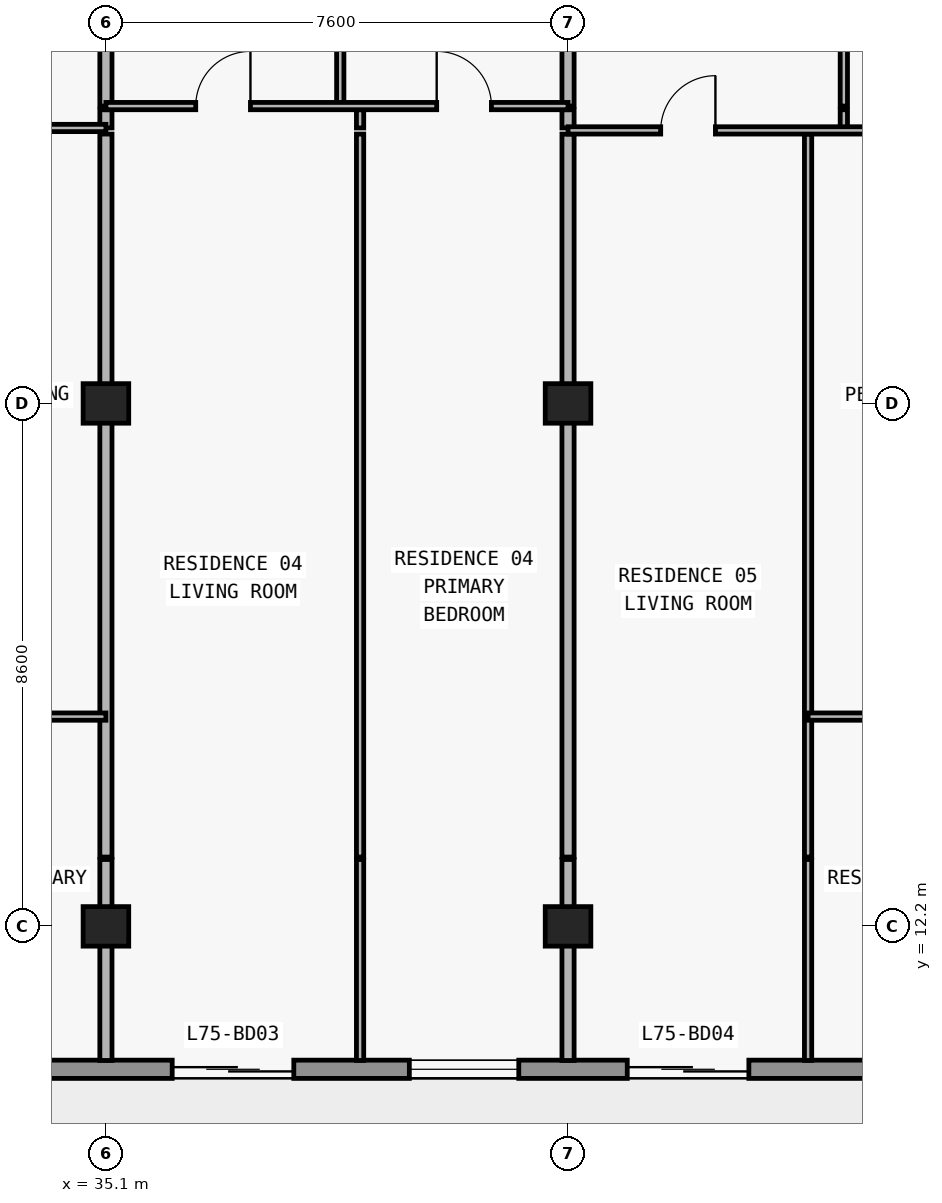
"""IFC4 building model, lengths in metres.
Left out: names, types, materials, properties, quantities, classifications, styles, units other than length and angle.
Written with IfcOpenShell. Run it as: python <this file> out.ifc"""

import sys

from ifc_helpers import new_model, si_unit, direction, frame, frame_2d, origin, origin_2d, place, context, subcontext, project, spatial, rectangle, extrude, element, fill, save


model = new_model("IFC4")
c1 = context("Model", 3, precision=1e-05, world=origin(), true_north=direction((0.0, 1.0)))
c2 = subcontext(c1, "Body", "Model", "MODEL_VIEW")
j1 = project(units=[si_unit("LENGTHUNIT", "METRE"), si_unit("PLANEANGLEUNIT", "RADIAN")], contexts=[c1])
p1 = place(None, origin())
s1 = spatial("IfcSite", under=j1, at=p1, CompositionType="ELEMENT")
p2 = place(p1, origin())
s2 = spatial("IfcBuilding", under=s1, at=p2, CompositionType="ELEMENT")
p3 = place(p2, frame((0.0, 0.0, 266.1)))
s3 = spatial("IfcBuildingStorey", under=s2, at=p3, CompositionType="ELEMENT", Elevation=266.1)
for number, where, z_axis, x_axis in (
    (1, (35.1, 12.2, 0.0), (0.0, 0.0, 1.0), (1.0, 0.0, 0.0)),
    (2, (42.7, 12.2, 0.0), (0.0, 0.0, 1.0), (1.0, 0.0, 0.0)),
    (3, (35.1, 20.8, 0.0), (0.0, 0.0, 1.0), (1.0, 0.0, 0.0)),
    (4, (42.7, 20.8, 0.0), (0.0, 0.0, 1.0), (1.0, 0.0, 0.0)),
):
    element("IfcColumn", number, at=place(p3, frame(where, z_axis=z_axis, x_axis=x_axis)), inside=s3, PredefinedType="COLUMN", context=c2, shape_type="SweptSolid", body=[
        extrude(rectangle(XDim=0.75, YDim=0.65, at=origin_2d()), origin(), (0.0, 0.0, 1.0), 3.0),
    ])
p4 = place(p3, frame((65.7, 9.85, 0.0), z_axis=(0.0, 0.0, 1.0), x_axis=(-1.0, 0.0, 0.0)))
e5 = element("IfcWall", 5, at=p4, inside=s3, PredefinedType="STANDARD", context=c2, shape_type="SweptSolid", body=[
    extrude(rectangle(XDim=53.6, YDim=0.3, at=frame_2d((26.8, 0.0))), origin(), (0.0, 0.0, 1.0), 3.0),
])
p5 = place(p4, frame((48.05, 0.0, 0.85)))
e6 = element("IfcOpeningElement", 6, at=p5, cuts=e5, PredefinedType="OPENING", context=c2, shape_type="SweptSolid", body=[
    extrude(rectangle(XDim=1.8, YDim=1.55, at=frame_2d((0.9, 0.775))), frame((0.0, 0.16, 0.0), z_axis=(0.0, -1.0, 0.0), x_axis=(1.0, 0.0, 0.0)), (0.0, 0.0, 1.0), 0.32),
])
p6 = place(p4, frame((44.09, 0.0, 0.0)))
e7 = element("IfcOpeningElement", 7, at=p6, cuts=e5, PredefinedType="OPENING", context=c2, shape_type="SweptSolid", body=[
    extrude(rectangle(XDim=2.0, YDim=2.3, at=frame_2d((1.0, 1.15))), frame((0.0, 0.16, 0.0), z_axis=(0.0, -1.0, 0.0), x_axis=(1.0, 0.0, 0.0)), (0.0, 0.0, 1.0), 0.32),
])
p7 = place(p4, frame((39.99, 0.0, 0.85)))
e8 = element("IfcOpeningElement", 8, at=p7, cuts=e5, PredefinedType="OPENING", context=c2, shape_type="SweptSolid", body=[
    extrude(rectangle(XDim=1.8, YDim=1.55, at=frame_2d((0.9, 0.775))), frame((0.0, 0.16, 0.0), z_axis=(0.0, -1.0, 0.0), x_axis=(1.0, 0.0, 0.0)), (0.0, 0.0, 1.0), 0.32),
])
p8 = place(p4, frame((36.026, 0.0, 0.0)))
e9 = element("IfcOpeningElement", 9, at=p8, cuts=e5, PredefinedType="OPENING", context=c2, shape_type="SweptSolid", body=[
    extrude(rectangle(XDim=2.0, YDim=2.3, at=frame_2d((1.0, 1.15))), frame((0.0, 0.16, 0.0), z_axis=(0.0, -1.0, 0.0), x_axis=(1.0, 0.0, 0.0)), (0.0, 0.0, 1.0), 0.32),
])
p9 = place(p4, frame((31.726, 0.0, 0.85)))
e10 = element("IfcOpeningElement", 10, at=p9, cuts=e5, PredefinedType="OPENING", context=c2, shape_type="SweptSolid", body=[
    extrude(rectangle(XDim=2.2, YDim=1.55, at=frame_2d((1.1, 0.775))), frame((0.0, 0.16, 0.0), z_axis=(0.0, -1.0, 0.0), x_axis=(1.0, 0.0, 0.0)), (0.0, 0.0, 1.0), 0.32),
])
p10 = place(p4, frame((27.51, 0.0, 0.0)))
e11 = element("IfcOpeningElement", 11, at=p10, cuts=e5, PredefinedType="OPENING", context=c2, shape_type="SweptSolid", body=[
    extrude(rectangle(XDim=2.0, YDim=2.3, at=frame_2d((1.0, 1.15))), frame((0.0, 0.16, 0.0), z_axis=(0.0, -1.0, 0.0), x_axis=(1.0, 0.0, 0.0)), (0.0, 0.0, 1.0), 0.32),
])
p11 = place(p4, frame((23.81, 0.0, 0.85)))
e12 = element("IfcOpeningElement", 12, at=p11, cuts=e5, PredefinedType="OPENING", context=c2, shape_type="SweptSolid", body=[
    extrude(rectangle(XDim=1.8, YDim=1.55, at=frame_2d((0.9, 0.775))), frame((0.0, 0.16, 0.0), z_axis=(0.0, -1.0, 0.0), x_axis=(1.0, 0.0, 0.0)), (0.0, 0.0, 1.0), 0.32),
])
p12 = place(p4, frame((20.026, 0.0, 0.0)))
e13 = element("IfcOpeningElement", 13, at=p12, cuts=e5, PredefinedType="OPENING", context=c2, shape_type="SweptSolid", body=[
    extrude(rectangle(XDim=2.0, YDim=2.3, at=frame_2d((1.0, 1.15))), frame((0.0, 0.16, 0.0), z_axis=(0.0, -1.0, 0.0), x_axis=(1.0, 0.0, 0.0)), (0.0, 0.0, 1.0), 0.32),
])
p13 = place(p4, frame((15.726, 0.0, 0.85)))
e14 = element("IfcOpeningElement", 14, at=p13, cuts=e5, PredefinedType="OPENING", context=c2, shape_type="SweptSolid", body=[
    extrude(rectangle(XDim=2.2, YDim=1.55, at=frame_2d((1.1, 0.775))), frame((0.0, 0.16, 0.0), z_axis=(0.0, -1.0, 0.0), x_axis=(1.0, 0.0, 0.0)), (0.0, 0.0, 1.0), 0.32),
])
p14 = place(p4, frame((11.69, 0.0, 0.0)))
e15 = element("IfcOpeningElement", 15, at=p14, cuts=e5, PredefinedType="OPENING", context=c2, shape_type="SweptSolid", body=[
    extrude(rectangle(XDim=2.0, YDim=2.3, at=frame_2d((1.0, 1.15))), frame((0.0, 0.16, 0.0), z_axis=(0.0, -1.0, 0.0), x_axis=(1.0, 0.0, 0.0)), (0.0, 0.0, 1.0), 0.32),
])
p15 = place(p4, frame((7.01, 0.0, 0.65)))
e16 = element("IfcOpeningElement", 16, at=p15, cuts=e5, PredefinedType="OPENING", context=c2, shape_type="SweptSolid", body=[
    extrude(rectangle(XDim=2.6, YDim=1.85, at=frame_2d((1.3, 0.925))), frame((0.0, 0.16, 0.0), z_axis=(0.0, -1.0, 0.0), x_axis=(1.0, 0.0, 0.0)), (0.0, 0.0, 1.0), 0.32),
])
p16 = place(p4, frame((2.0, 0.0, 0.85)))
e17 = element("IfcOpeningElement", 17, at=p16, cuts=e5, PredefinedType="OPENING", context=c2, shape_type="SweptSolid", body=[
    extrude(rectangle(XDim=2.2, YDim=1.55, at=frame_2d((1.1, 0.775))), frame((0.0, 0.16, 0.0), z_axis=(0.0, -1.0, 0.0), x_axis=(1.0, 0.0, 0.0)), (0.0, 0.0, 1.0), 0.32),
])
p17 = place(p3, frame((35.1, 9.995, 0.0), z_axis=(0.0, 0.0, 1.0), x_axis=(0.0, 1.0, 0.0)))
e18 = element("IfcWall", 18, at=p17, inside=s3, PredefinedType="PARTITIONING", context=c2, shape_type="SweptSolid", body=[
    extrude(rectangle(XDim=3.305, YDim=0.2, at=frame_2d((1.652, 0.0))), origin(), (0.0, 0.0, 1.0), 2.213),
])
p18 = place(p3, frame((35.1, 13.34, 0.0), z_axis=(0.0, 0.0, 1.0), x_axis=(0.0, 1.0, 0.0)))
e19 = element("IfcWall", 19, at=p18, inside=s3, PredefinedType="PARTITIONING", context=c2, shape_type="SweptSolid", body=[
    extrude(rectangle(XDim=11.89, YDim=0.2, at=frame_2d((5.945, 0.0))), origin(), (0.0, 0.0, 1.0), 2.213),
])
p19 = place(p3, frame((35.1, 25.33, 0.0), z_axis=(0.0, 0.0, 1.0), x_axis=(0.0, 1.0, 0.0)))
e20 = element("IfcWall", 20, at=p19, inside=s3, PredefinedType="PARTITIONING", context=c2, shape_type="SweptSolid", body=[
    extrude(rectangle(XDim=0.3, YDim=0.2, at=frame_2d((0.15, 0.0))), origin(), (0.0, 0.0, 1.0), 2.213),
])
p20 = place(p3, frame((35.1, 25.69, 0.0), z_axis=(0.0, 0.0, 1.0), x_axis=(0.0, 1.0, 0.0)))
e21 = element("IfcWall", 21, at=p20, inside=s3, PredefinedType="PARTITIONING", context=c2, shape_type="SweptSolid", body=[
    extrude(rectangle(XDim=4.69, YDim=0.2, at=frame_2d((2.345, 0.0))), origin(), (0.0, 0.0, 1.0), 2.213),
])
p21 = place(p3, frame((38.954, 25.69, 0.0), z_axis=(0.0, 0.0, 1.0), x_axis=(0.0, 1.0, 0.0)))
e22 = element("IfcWall", 22, at=p21, inside=s3, PredefinedType="PARTITIONING", context=c2, shape_type="SweptSolid", body=[
    extrude(rectangle(XDim=4.69, YDim=0.12, at=frame_2d((2.345, 0.0))), origin(), (0.0, 0.0, 1.0), 2.579),
])
p22 = place(p21, frame((1.895, 0.0, 0.0)))
e23 = element("IfcOpeningElement", 23, at=p22, cuts=e22, PredefinedType="OPENING", context=c2, shape_type="SweptSolid", body=[
    extrude(rectangle(XDim=0.9, YDim=2.15, at=frame_2d((0.45, 1.075))), frame((0.0, 0.07, 0.0), z_axis=(0.0, -1.0, 0.0), x_axis=(1.0, 0.0, 0.0)), (0.0, 0.0, 1.0), 0.14),
])
p23 = place(p3, frame((39.28, 9.995, 0.0), z_axis=(0.0, 0.0, 1.0), x_axis=(0.0, 1.0, 0.0)))
e24 = element("IfcWall", 24, at=p23, inside=s3, PredefinedType="PARTITIONING", context=c2, shape_type="SweptSolid", body=[
    extrude(rectangle(XDim=3.305, YDim=0.12, at=frame_2d((1.652, 0.0))), origin(), (0.0, 0.0, 1.0), 3.0),
])
p24 = place(p3, frame((39.28, 13.34, 0.0), z_axis=(0.0, 0.0, 1.0), x_axis=(0.0, 1.0, 0.0)))
e25 = element("IfcWall", 25, at=p24, inside=s3, PredefinedType="PARTITIONING", context=c2, shape_type="SweptSolid", body=[
    extrude(rectangle(XDim=11.89, YDim=0.12, at=frame_2d((5.945, 0.0))), origin(), (0.0, 0.0, 1.0), 3.0),
])
p25 = place(p3, frame((39.28, 25.33, 0.0), z_axis=(0.0, 0.0, 1.0), x_axis=(0.0, 1.0, 0.0)))
e26 = element("IfcWall", 26, at=p25, inside=s3, PredefinedType="PARTITIONING", context=c2, shape_type="SweptSolid", body=[
    extrude(rectangle(XDim=0.3, YDim=0.12, at=frame_2d((0.15, 0.0))), origin(), (0.0, 0.0, 1.0), 3.0),
])
p26 = place(p3, frame((42.7, 9.995, 0.0), z_axis=(0.0, 0.0, 1.0), x_axis=(0.0, 1.0, 0.0)))
e27 = element("IfcWall", 27, at=p26, inside=s3, PredefinedType="PARTITIONING", context=c2, shape_type="SweptSolid", body=[
    extrude(rectangle(XDim=3.305, YDim=0.2, at=frame_2d((1.652, 0.0))), origin(), (0.0, 0.0, 1.0), 2.213),
])
p27 = place(p3, frame((42.7, 13.34, 0.0), z_axis=(0.0, 0.0, 1.0), x_axis=(0.0, 1.0, 0.0)))
e28 = element("IfcWall", 28, at=p27, inside=s3, PredefinedType="PARTITIONING", context=c2, shape_type="SweptSolid", body=[
    extrude(rectangle(XDim=11.89, YDim=0.2, at=frame_2d((5.945, 0.0))), origin(), (0.0, 0.0, 1.0), 2.213),
])
p28 = place(p3, frame((42.7, 25.33, 0.0), z_axis=(0.0, 0.0, 1.0), x_axis=(0.0, 1.0, 0.0)))
e29 = element("IfcWall", 29, at=p28, inside=s3, PredefinedType="PARTITIONING", context=c2, shape_type="SweptSolid", body=[
    extrude(rectangle(XDim=0.3, YDim=0.2, at=frame_2d((0.15, 0.0))), origin(), (0.0, 0.0, 1.0), 2.213),
])
p29 = place(p3, frame((42.7, 25.69, 0.0), z_axis=(0.0, 0.0, 1.0), x_axis=(0.0, 1.0, 0.0)))
e30 = element("IfcWall", 30, at=p29, inside=s3, PredefinedType="PARTITIONING", context=c2, shape_type="SweptSolid", body=[
    extrude(rectangle(XDim=4.69, YDim=0.2, at=frame_2d((2.345, 0.0))), origin(), (0.0, 0.0, 1.0), 2.213),
])
p30 = place(p3, frame((46.648, 9.995, 0.0), z_axis=(0.0, 0.0, 1.0), x_axis=(0.0, 1.0, 0.0)))
e31 = element("IfcWall", 31, at=p30, inside=s3, PredefinedType="PARTITIONING", context=c2, shape_type="SweptSolid", body=[
    extrude(rectangle(XDim=3.305, YDim=0.12, at=frame_2d((1.652, 0.0))), origin(), (0.0, 0.0, 1.0), 3.0),
])
p31 = place(p3, frame((46.648, 13.34, 0.0), z_axis=(0.0, 0.0, 1.0), x_axis=(0.0, 1.0, 0.0)))
e32 = element("IfcWall", 32, at=p31, inside=s3, PredefinedType="PARTITIONING", context=c2, shape_type="SweptSolid", body=[
    extrude(rectangle(XDim=11.89, YDim=0.12, at=frame_2d((5.945, 0.0))), origin(), (0.0, 0.0, 1.0), 3.0),
])
p32 = place(p3, frame((47.236, 25.33, 0.0), z_axis=(0.0, 0.0, 1.0), x_axis=(0.0, 1.0, 0.0)))
e33 = element("IfcWall", 33, at=p32, inside=s3, PredefinedType="PARTITIONING", context=c2, shape_type="SweptSolid", body=[
    extrude(rectangle(XDim=0.3, YDim=0.12, at=frame_2d((0.15, 0.0))), origin(), (0.0, 0.0, 1.0), 3.0),
])
p33 = place(p3, frame((47.236, 25.69, 0.0), z_axis=(0.0, 0.0, 1.0), x_axis=(0.0, 1.0, 0.0)))
e34 = element("IfcWall", 34, at=p33, inside=s3, PredefinedType="PARTITIONING", context=c2, shape_type="SweptSolid", body=[
    extrude(rectangle(XDim=4.69, YDim=0.12, at=frame_2d((2.345, 0.0))), origin(), (0.0, 0.0, 1.0), 3.0),
])
p34 = place(p33, frame((1.895, 0.0, 0.0)))
e35 = element("IfcOpeningElement", 35, at=p34, cuts=e34, PredefinedType="OPENING", context=c2, shape_type="SweptSolid", body=[
    extrude(rectangle(XDim=0.9, YDim=2.15, at=frame_2d((0.45, 1.075))), frame((0.0, 0.07, 0.0), z_axis=(0.0, -1.0, 0.0), x_axis=(1.0, 0.0, 0.0)), (0.0, 0.0, 1.0), 0.14),
])
p35 = place(p3, frame((31.5, 15.65, 0.0), z_axis=(0.0, 0.0, 1.0), x_axis=(1.0, 0.0, 0.0)))
e36 = element("IfcWall", 36, at=p35, inside=s3, PredefinedType="PARTITIONING", context=c2, shape_type="SweptSolid", body=[
    extrude(rectangle(XDim=3.6, YDim=0.12, at=frame_2d((1.8, 0.0))), origin(), (0.0, 0.0, 1.0), 3.0),
])
p36 = place(p35, frame((1.35, 0.0, 0.0)))
e37 = element("IfcOpeningElement", 37, at=p36, cuts=e36, PredefinedType="OPENING", context=c2, shape_type="SweptSolid", body=[
    extrude(rectangle(XDim=0.9, YDim=2.15, at=frame_2d((0.45, 1.075))), frame((0.0, 0.07, 0.0), z_axis=(0.0, -1.0, 0.0), x_axis=(1.0, 0.0, 0.0)), (0.0, 0.0, 1.0), 0.14),
])
p37 = place(p3, frame((46.648, 15.65, 0.0), z_axis=(0.0, 0.0, 1.0), x_axis=(1.0, 0.0, 0.0)))
e38 = element("IfcWall", 38, at=p37, inside=s3, PredefinedType="PARTITIONING", context=c2, shape_type="SweptSolid", body=[
    extrude(rectangle(XDim=4.452, YDim=0.12, at=frame_2d((2.226, 0.0))), origin(), (0.0, 0.0, 1.0), 3.0),
])
p38 = place(p37, frame((1.776, 0.0, 0.0)))
e39 = element("IfcOpeningElement", 39, at=p38, cuts=e38, PredefinedType="OPENING", context=c2, shape_type="SweptSolid", body=[
    extrude(rectangle(XDim=0.9, YDim=2.15, at=frame_2d((0.45, 1.075))), frame((0.0, 0.07, 0.0), z_axis=(0.0, -1.0, 0.0), x_axis=(1.0, 0.0, 0.0)), (0.0, 0.0, 1.0), 0.14),
])
p39 = place(p3, frame((42.7, 25.29, 0.0), z_axis=(0.0, 0.0, 1.0), x_axis=(1.0, 0.0, 0.0)))
e40 = element("IfcWall", 40, at=p39, inside=s3, PredefinedType="PARTITIONING", context=c2, shape_type="SweptSolid", body=[
    extrude(rectangle(XDim=8.18, YDim=0.12, at=frame_2d((4.09, 0.0))), origin(), (0.0, 0.0, 1.0), 3.0),
])
p40 = place(p39, frame((1.524, 0.0, 0.0)))
e41 = element("IfcOpeningElement", 41, at=p40, cuts=e40, PredefinedType="OPENING", context=c2, shape_type="SweptSolid", body=[
    extrude(rectangle(XDim=0.9, YDim=2.15, at=frame_2d((0.45, 1.075))), frame((0.0, 0.07, 0.0), z_axis=(0.0, -1.0, 0.0), x_axis=(1.0, 0.0, 0.0)), (0.0, 0.0, 1.0), 0.14),
])
p41 = place(p39, frame((5.908, 0.0, 0.0)))
e42 = element("IfcOpeningElement", 42, at=p41, cuts=e40, PredefinedType="OPENING", context=c2, shape_type="SweptSolid", body=[
    extrude(rectangle(XDim=0.9, YDim=2.15, at=frame_2d((0.45, 1.075))), frame((0.0, 0.07, 0.0), z_axis=(0.0, -1.0, 0.0), x_axis=(1.0, 0.0, 0.0)), (0.0, 0.0, 1.0), 0.14),
])
p42 = place(p3, frame((31.5, 25.33, 0.0), z_axis=(0.0, 0.0, 1.0), x_axis=(1.0, 0.0, 0.0)))
e43 = element("IfcWall", 43, at=p42, inside=s3, PredefinedType="PARTITIONING", context=c2, shape_type="SweptSolid", body=[
    extrude(rectangle(XDim=3.6, YDim=0.12, at=frame_2d((1.8, 0.0))), origin(), (0.0, 0.0, 1.0), 3.0),
])
p43 = place(p42, frame((1.35, 0.0, 0.0)))
e44 = element("IfcOpeningElement", 44, at=p43, cuts=e43, PredefinedType="OPENING", context=c2, shape_type="SweptSolid", body=[
    extrude(rectangle(XDim=0.9, YDim=2.15, at=frame_2d((0.45, 1.075))), frame((0.0, 0.07, 0.0), z_axis=(0.0, -1.0, 0.0), x_axis=(1.0, 0.0, 0.0)), (0.0, 0.0, 1.0), 0.14),
])
p44 = place(p3, frame((35.1, 25.69, 0.0), z_axis=(0.0, 0.0, 1.0), x_axis=(1.0, 0.0, 0.0)))
e45 = element("IfcWall", 45, at=p44, inside=s3, PredefinedType="PARTITIONING", context=c2, shape_type="SweptSolid", body=[
    extrude(rectangle(XDim=7.6, YDim=0.12, at=frame_2d((3.8, 0.0))), origin(), (0.0, 0.0, 1.0), 3.0),
])
p45 = place(p44, frame((1.477, 0.0, 0.0)))
e46 = element("IfcOpeningElement", 46, at=p45, cuts=e45, PredefinedType="OPENING", context=c2, shape_type="SweptSolid", body=[
    extrude(rectangle(XDim=0.9, YDim=2.15, at=frame_2d((0.45, 1.075))), frame((0.0, 0.07, 0.0), z_axis=(0.0, -1.0, 0.0), x_axis=(1.0, 0.0, 0.0)), (0.0, 0.0, 1.0), 0.14),
])
p46 = place(p44, frame((5.44, 0.0, 0.0)))
e47 = element("IfcOpeningElement", 47, at=p46, cuts=e45, PredefinedType="OPENING", context=c2, shape_type="SweptSolid", body=[
    extrude(rectangle(XDim=0.9, YDim=2.15, at=frame_2d((0.45, 1.075))), frame((0.0, 0.07, 0.0), z_axis=(0.0, -1.0, 0.0), x_axis=(1.0, 0.0, 0.0)), (0.0, 0.0, 1.0), 0.14),
])
p47 = place(p10, origin())
e48 = element("IfcDoor", 48, at=p47, inside=s3, OperationType="DOUBLE_DOOR_SLIDING", PredefinedType="DOOR", context=c2, shape_type="SweptSolid", body=[
    extrude(rectangle(XDim=2.0, YDim=2.3, at=frame_2d((1.0, 1.15))), frame((0.0, 0.025, 0.0), z_axis=(0.0, -1.0, 0.0), x_axis=(1.0, 0.0, 0.0)), (0.0, 0.0, 1.0), 0.05),
])
fill(e11, e48)
p48 = place(p11, origin())
e49 = element("IfcWindow", 49, at=p48, inside=s3, PartitioningType="SINGLE_PANEL", PredefinedType="WINDOW", context=c2, shape_type="SweptSolid", body=[
    extrude(rectangle(XDim=1.8, YDim=1.55, at=frame_2d((0.9, 0.775))), frame((0.0, 0.03, 0.0), z_axis=(0.0, -1.0, 0.0), x_axis=(1.0, 0.0, 0.0)), (0.0, 0.0, 1.0), 0.06),
])
fill(e12, e49)
p49 = place(p12, origin())
e50 = element("IfcDoor", 50, at=p49, inside=s3, OperationType="DOUBLE_DOOR_SLIDING", PredefinedType="DOOR", context=c2, shape_type="SweptSolid", body=[
    extrude(rectangle(XDim=2.0, YDim=2.3, at=frame_2d((1.0, 1.15))), frame((0.0, 0.025, 0.0), z_axis=(0.0, -1.0, 0.0), x_axis=(1.0, 0.0, 0.0)), (0.0, 0.0, 1.0), 0.05),
])
fill(e13, e50)
p50 = place(p45, origin())
e51 = element("IfcDoor", 51, at=p50, inside=s3, OperationType="SINGLE_SWING_RIGHT", PredefinedType="DOOR", context=c2, shape_type="SweptSolid", body=[
    extrude(rectangle(XDim=0.9, YDim=2.15, at=frame_2d((0.45, 1.075))), frame((0.0, 0.025, 0.0), z_axis=(0.0, -1.0, 0.0), x_axis=(1.0, 0.0, 0.0)), (0.0, 0.0, 1.0), 0.05),
])
fill(e46, e51)
p51 = place(p46, origin())
e52 = element("IfcDoor", 52, at=p51, inside=s3, OperationType="SINGLE_SWING_LEFT", PredefinedType="DOOR", context=c2, shape_type="SweptSolid", body=[
    extrude(rectangle(XDim=0.9, YDim=2.15, at=frame_2d((0.45, 1.075))), frame((0.0, 0.025, 0.0), z_axis=(0.0, -1.0, 0.0), x_axis=(1.0, 0.0, 0.0)), (0.0, 0.0, 1.0), 0.05),
])
fill(e47, e52)
p52 = place(p40, origin())
e53 = element("IfcDoor", 53, at=p52, inside=s3, OperationType="SINGLE_SWING_RIGHT", PredefinedType="DOOR", context=c2, shape_type="SweptSolid", body=[
    extrude(rectangle(XDim=0.9, YDim=2.15, at=frame_2d((0.45, 1.075))), frame((0.0, 0.025, 0.0), z_axis=(0.0, -1.0, 0.0), x_axis=(1.0, 0.0, 0.0)), (0.0, 0.0, 1.0), 0.05),
])
fill(e41, e53)
save(model, sys.argv[1])
